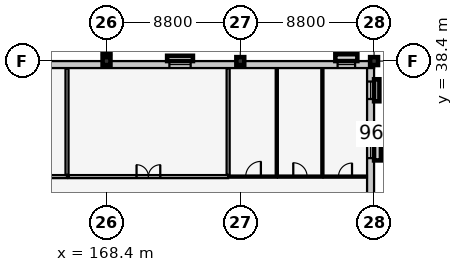
"""IFC4 building model, lengths in metres.
Left out: names, types, materials, properties, quantities, classifications, styles, units other than length and angle.
Written with IfcOpenShell. Run it as: python <this file> out.ifc"""

import sys

from ifc_helpers import new_model, si_unit, direction, frame, frame_2d, origin, origin_2d, place, context, subcontext, project, spatial, rectangle, extrude, element, fill, save


model = new_model("IFC4")
c1 = context("Model", 3, precision=1e-05, world=origin(), true_north=direction((0.0, 1.0)))
c2 = subcontext(c1, "Body", "Model", "MODEL_VIEW")
j1 = project(units=[si_unit("LENGTHUNIT", "METRE"), si_unit("PLANEANGLEUNIT", "RADIAN")], contexts=[c1])
p1 = place(None, origin())
s1 = spatial("IfcSite", under=j1, at=p1, CompositionType="ELEMENT")
p2 = place(p1, origin())
s2 = spatial("IfcBuilding", under=s1, at=p2, CompositionType="ELEMENT")
p3 = place(p2, frame((0.0, 0.0, 5.4)))
s3 = spatial("IfcBuildingStorey", under=s2, at=p3, CompositionType="ELEMENT", Elevation=5.4)
for number, where, z_axis, x_axis in (
    (1, (168.4, 38.4, 0.0), (0.0, 0.0, 1.0), (1.0, 0.0, 0.0)),
    (2, (177.2, 38.4, 0.0), (0.0, 0.0, 1.0), (1.0, 0.0, 0.0)),
    (3, (186.0, 38.4, 0.0), (0.0, 0.0, 1.0), (1.0, 0.0, 0.0)),
    (4, (168.4, 39.2, 0.0), (0.0, 0.0, 1.0), (1.0, 0.0, 0.0)),
):
    element("IfcColumn", number, at=place(p3, frame(where, z_axis=z_axis, x_axis=x_axis)), inside=s3, PredefinedType="COLUMN", context=c2, shape_type="SweptSolid", body=[
        extrude(rectangle(XDim=0.52, YDim=0.52, at=origin_2d()), origin(), (0.0, 0.0, 1.0), 4.2),
    ])
p4 = place(p3, frame((185.77, 38.4, 0.0), z_axis=(0.0, 0.0, 1.0), x_axis=(0.0, -1.0, 0.0)))
e5 = element("IfcWall", 5, at=p4, inside=s3, PredefinedType="SOLIDWALL", context=c2, shape_type="SweptSolid", body=[
    extrude(rectangle(XDim=38.4, YDim=0.46, at=frame_2d((19.2, 0.0))), origin(), (0.0, 0.0, 1.0), 3.095),
])
p5 = place(p4, frame((1.345, 0.0, 0.9)))
e6 = element("IfcOpeningElement", 6, at=p5, cuts=e5, PredefinedType="OPENING", context=c2, shape_type="SweptSolid", body=[
    extrude(rectangle(XDim=1.15, YDim=1.6, at=frame_2d((0.575, 0.8))), frame((0.0, 0.242, 0.0), z_axis=(0.0, -1.0, 0.0), x_axis=(1.0, 0.0, 0.0)), (0.0, 0.0, 1.0), 0.484),
])
p6 = place(p4, frame((5.135, 0.0, 0.9)))
e7 = element("IfcOpeningElement", 7, at=p6, cuts=e5, PredefinedType="OPENING", context=c2, shape_type="SweptSolid", body=[
    extrude(rectangle(XDim=1.25, YDim=1.6, at=frame_2d((0.625, 0.8))), frame((0.0, 0.242, 0.0), z_axis=(0.0, -1.0, 0.0), x_axis=(1.0, 0.0, 0.0)), (0.0, 0.0, 1.0), 0.484),
])
p7 = place(p3, frame((124.0, 38.17, 0.0), z_axis=(0.0, 0.0, 1.0), x_axis=(1.0, 0.0, 0.0)))
e8 = element("IfcWall", 8, at=p7, inside=s3, PredefinedType="SOLIDWALL", context=c2, shape_type="SweptSolid", body=[
    extrude(rectangle(XDim=62.0, YDim=0.46, at=frame_2d((31.0, 0.0))), origin(), (0.0, 0.0, 1.0), 3.095),
])
p8 = place(p7, frame((1.134, 0.0, 0.9)))
e9 = element("IfcOpeningElement", 9, at=p8, cuts=e8, PredefinedType="OPENING", context=c2, shape_type="SweptSolid", body=[
    extrude(rectangle(XDim=1.38, YDim=1.6, at=frame_2d((0.69, 0.8))), frame((0.0, 0.242, 0.0), z_axis=(0.0, -1.0, 0.0), x_axis=(1.0, 0.0, 0.0)), (0.0, 0.0, 1.0), 0.484),
])
p9 = place(p7, frame((4.721, 0.0, 0.9)))
e10 = element("IfcOpeningElement", 10, at=p9, cuts=e8, PredefinedType="OPENING", context=c2, shape_type="SweptSolid", body=[
    extrude(rectangle(XDim=1.5, YDim=1.6, at=frame_2d((0.75, 0.8))), frame((0.0, 0.242, 0.0), z_axis=(0.0, -1.0, 0.0), x_axis=(1.0, 0.0, 0.0)), (0.0, 0.0, 1.0), 0.484),
])
p10 = place(p7, frame((12.205, 0.0, 0.9)))
e11 = element("IfcOpeningElement", 11, at=p10, cuts=e8, PredefinedType="OPENING", context=c2, shape_type="SweptSolid", body=[
    extrude(rectangle(XDim=1.12, YDim=1.75, at=frame_2d((0.56, 0.875))), frame((0.0, 0.242, 0.0), z_axis=(0.0, -1.0, 0.0), x_axis=(1.0, 0.0, 0.0)), (0.0, 0.0, 1.0), 0.484),
])
p11 = place(p7, frame((15.792, 0.0, 0.9)))
e12 = element("IfcOpeningElement", 12, at=p11, cuts=e8, PredefinedType="OPENING", context=c2, shape_type="SweptSolid", body=[
    extrude(rectangle(XDim=1.24, YDim=1.75, at=frame_2d((0.62, 0.875))), frame((0.0, 0.242, 0.0), z_axis=(0.0, -1.0, 0.0), x_axis=(1.0, 0.0, 0.0)), (0.0, 0.0, 1.0), 0.484),
])
p12 = place(p7, frame((19.389, 0.0, 0.9)))
e13 = element("IfcOpeningElement", 13, at=p12, cuts=e8, PredefinedType="OPENING", context=c2, shape_type="SweptSolid", body=[
    extrude(rectangle(XDim=1.34, YDim=1.75, at=frame_2d((0.67, 0.875))), frame((0.0, 0.242, 0.0), z_axis=(0.0, -1.0, 0.0), x_axis=(1.0, 0.0, 0.0)), (0.0, 0.0, 1.0), 0.484),
])
p13 = place(p7, frame((34.147, 0.0, 0.9)))
e14 = element("IfcOpeningElement", 14, at=p13, cuts=e8, PredefinedType="OPENING", context=c2, shape_type="SweptSolid", body=[
    extrude(rectangle(XDim=1.0, YDim=1.35, at=frame_2d((0.5, 0.675))), frame((0.0, 0.242, 0.0), z_axis=(0.0, -1.0, 0.0), x_axis=(1.0, 0.0, 0.0)), (0.0, 0.0, 1.0), 0.484),
])
p14 = place(p7, frame((37.744, 0.0, 0.9)))
e15 = element("IfcOpeningElement", 15, at=p14, cuts=e8, PredefinedType="OPENING", context=c2, shape_type="SweptSolid", body=[
    extrude(rectangle(XDim=1.1, YDim=1.35, at=frame_2d((0.55, 0.675))), frame((0.0, 0.242, 0.0), z_axis=(0.0, -1.0, 0.0), x_axis=(1.0, 0.0, 0.0)), (0.0, 0.0, 1.0), 0.484),
])
p15 = place(p7, frame((48.535, 0.0, 0.9)))
e16 = element("IfcOpeningElement", 16, at=p15, cuts=e8, PredefinedType="OPENING", context=c2, shape_type="SweptSolid", body=[
    extrude(rectangle(XDim=1.4, YDim=1.35, at=frame_2d((0.7, 0.675))), frame((0.0, 0.242, 0.0), z_axis=(0.0, -1.0, 0.0), x_axis=(1.0, 0.0, 0.0)), (0.0, 0.0, 1.0), 0.484),
])
p16 = place(p7, frame((59.602, 0.0, 0.9)))
e17 = element("IfcOpeningElement", 17, at=p16, cuts=e8, PredefinedType="OPENING", context=c2, shape_type="SweptSolid", body=[
    extrude(rectangle(XDim=1.15, YDim=1.45, at=frame_2d((0.575, 0.725))), frame((0.0, 0.242, 0.0), z_axis=(0.0, -1.0, 0.0), x_axis=(1.0, 0.0, 0.0)), (0.0, 0.0, 1.0), 0.484),
])
p17 = place(p3, frame((155.46, 30.8, 0.0), z_axis=(0.0, 0.0, 1.0), x_axis=(1.0, 0.0, 0.0)))
e18 = element("IfcWall", 18, at=p17, inside=s3, PredefinedType="PARTITIONING", context=c2, shape_type="SweptSolid", body=[
    extrude(rectangle(XDim=10.34, YDim=0.2, at=frame_2d((5.17, 0.0))), origin(), (0.0, 0.0, 1.0), 3.94),
])
p18 = place(p17, frame((4.33, 0.0, 0.0)))
e19 = element("IfcOpeningElement", 19, at=p18, cuts=e18, PredefinedType="OPENING", context=c2, shape_type="SweptSolid", body=[
    extrude(rectangle(XDim=1.68, YDim=2.3, at=frame_2d((0.84, 1.15))), frame((0.0, 0.112, 0.0), z_axis=(0.0, -1.0, 0.0), x_axis=(1.0, 0.0, 0.0)), (0.0, 0.0, 1.0), 0.224),
])
p19 = place(p3, frame((165.8, 30.91, 0.0), z_axis=(0.0, 0.0, 1.0), x_axis=(0.0, 1.0, 0.0)))
e20 = element("IfcWall", 20, at=p19, inside=s3, PredefinedType="PARTITIONING", context=c2, shape_type="SweptSolid", body=[
    extrude(rectangle(XDim=7.02, YDim=0.2, at=frame_2d((3.51, 0.0))), origin(), (0.0, 0.0, 1.0), 3.94),
])
p20 = place(p3, frame((165.91, 30.8, 0.0), z_axis=(0.0, 0.0, 1.0), x_axis=(1.0, 0.0, 0.0)))
e21 = element("IfcWall", 21, at=p20, inside=s3, PredefinedType="PARTITIONING", context=c2, shape_type="SweptSolid", body=[
    extrude(rectangle(XDim=10.49, YDim=0.2, at=frame_2d((5.245, 0.0))), origin(), (0.0, 0.0, 1.0), 3.94),
])
p21 = place(p20, frame((4.465, 0.0, 0.0)))
e22 = element("IfcOpeningElement", 22, at=p21, cuts=e21, PredefinedType="OPENING", context=c2, shape_type="SweptSolid", body=[
    extrude(rectangle(XDim=1.56, YDim=2.25, at=frame_2d((0.78, 1.125))), frame((0.0, 0.112, 0.0), z_axis=(0.0, -1.0, 0.0), x_axis=(1.0, 0.0, 0.0)), (0.0, 0.0, 1.0), 0.224),
])
p22 = place(p3, frame((176.4, 30.91, 0.0), z_axis=(0.0, 0.0, 1.0), x_axis=(0.0, 1.0, 0.0)))
e23 = element("IfcWall", 23, at=p22, inside=s3, PredefinedType="PARTITIONING", context=c2, shape_type="SweptSolid", body=[
    extrude(rectangle(XDim=7.02, YDim=0.2, at=frame_2d((3.51, 0.0))), origin(), (0.0, 0.0, 1.0), 3.94),
])
p23 = place(p3, frame((176.51, 30.8, 0.0), z_axis=(0.0, 0.0, 1.0), x_axis=(1.0, 0.0, 0.0)))
e24 = element("IfcWall", 24, at=p23, inside=s3, PredefinedType="PARTITIONING", context=c2, shape_type="SweptSolid", body=[
    extrude(rectangle(XDim=3.09, YDim=0.14, at=frame_2d((1.545, 0.0))), origin(), (0.0, 0.0, 1.0), 3.94),
])
p24 = place(p23, frame((1.045, 0.0, 0.0)))
e25 = element("IfcOpeningElement", 25, at=p24, cuts=e24, PredefinedType="OPENING", context=c2, shape_type="SweptSolid", body=[
    extrude(rectangle(XDim=1.0, YDim=2.1, at=frame_2d((0.5, 1.05))), frame((0.0, 0.082, 0.0), z_axis=(0.0, -1.0, 0.0), x_axis=(1.0, 0.0, 0.0)), (0.0, 0.0, 1.0), 0.164),
])
p25 = place(p3, frame((179.6, 30.88, 0.0), z_axis=(0.0, 0.0, 1.0), x_axis=(0.0, 1.0, 0.0)))
e26 = element("IfcWall", 26, at=p25, inside=s3, PredefinedType="PARTITIONING", context=c2, shape_type="SweptSolid", body=[
    extrude(rectangle(XDim=7.05, YDim=0.14, at=frame_2d((3.525, 0.0))), origin(), (0.0, 0.0, 1.0), 3.94),
])
p26 = place(p3, frame((179.68, 30.8, 0.0), z_axis=(0.0, 0.0, 1.0), x_axis=(1.0, 0.0, 0.0)))
e27 = element("IfcWall", 27, at=p26, inside=s3, PredefinedType="PARTITIONING", context=c2, shape_type="SweptSolid", body=[
    extrude(rectangle(XDim=2.92, YDim=0.14, at=frame_2d((1.46, 0.0))), origin(), (0.0, 0.0, 1.0), 3.94),
])
p27 = place(p26, frame((1.005, 0.0, 0.0)))
e28 = element("IfcOpeningElement", 28, at=p27, cuts=e27, PredefinedType="OPENING", context=c2, shape_type="SweptSolid", body=[
    extrude(rectangle(XDim=0.91, YDim=2.06, at=frame_2d((0.455, 1.03))), frame((0.0, 0.082, 0.0), z_axis=(0.0, -1.0, 0.0), x_axis=(1.0, 0.0, 0.0)), (0.0, 0.0, 1.0), 0.164),
])
p28 = place(p3, frame((182.6, 30.88, 0.0), z_axis=(0.0, 0.0, 1.0), x_axis=(0.0, 1.0, 0.0)))
e29 = element("IfcWall", 29, at=p28, inside=s3, PredefinedType="PARTITIONING", context=c2, shape_type="SweptSolid", body=[
    extrude(rectangle(XDim=7.05, YDim=0.14, at=frame_2d((3.525, 0.0))), origin(), (0.0, 0.0, 1.0), 3.94),
])
p29 = place(p3, frame((182.68, 30.8, 0.0), z_axis=(0.0, 0.0, 1.0), x_axis=(1.0, 0.0, 0.0)))
e30 = element("IfcWall", 30, at=p29, inside=s3, PredefinedType="PARTITIONING", context=c2, shape_type="SweptSolid", body=[
    extrude(rectangle(XDim=2.85, YDim=0.14, at=frame_2d((1.425, 0.0))), origin(), (0.0, 0.0, 1.0), 3.94),
])
p30 = place(p29, frame((0.98, 0.0, 0.0)))
e31 = element("IfcOpeningElement", 31, at=p30, cuts=e30, PredefinedType="OPENING", context=c2, shape_type="SweptSolid", body=[
    extrude(rectangle(XDim=0.89, YDim=2.05, at=frame_2d((0.445, 1.025))), frame((0.0, 0.082, 0.0), z_axis=(0.0, -1.0, 0.0), x_axis=(1.0, 0.0, 0.0)), (0.0, 0.0, 1.0), 0.164),
])
p31 = place(p5, origin())
e32 = element("IfcWindow", 32, at=p31, inside=s3, PartitioningType="SINGLE_PANEL", PredefinedType="WINDOW", context=c2, shape_type="SweptSolid", body=[
    extrude(rectangle(XDim=1.15, YDim=1.6, at=frame_2d((0.575, 0.8))), frame((0.0, 0.03, 0.0), z_axis=(0.0, -1.0, 0.0), x_axis=(1.0, 0.0, 0.0)), (0.0, 0.0, 1.0), 0.06),
])
fill(e6, e32)
p32 = place(p6, origin())
e33 = element("IfcWindow", 33, at=p32, inside=s3, PartitioningType="SINGLE_PANEL", PredefinedType="WINDOW", context=c2, shape_type="SweptSolid", body=[
    extrude(rectangle(XDim=1.25, YDim=1.6, at=frame_2d((0.625, 0.8))), frame((0.0, 0.03, 0.0), z_axis=(0.0, -1.0, 0.0), x_axis=(1.0, 0.0, 0.0)), (0.0, 0.0, 1.0), 0.06),
])
fill(e7, e33)
p33 = place(p15, origin())
e34 = element("IfcWindow", 34, at=p33, inside=s3, PartitioningType="SINGLE_PANEL", PredefinedType="WINDOW", context=c2, shape_type="SweptSolid", body=[
    extrude(rectangle(XDim=1.4, YDim=1.35, at=frame_2d((0.7, 0.675))), frame((0.0, 0.03, 0.0), z_axis=(0.0, -1.0, 0.0), x_axis=(1.0, 0.0, 0.0)), (0.0, 0.0, 1.0), 0.06),
])
fill(e16, e34)
p34 = place(p16, origin())
e35 = element("IfcWindow", 35, at=p34, inside=s3, PartitioningType="SINGLE_PANEL", PredefinedType="WINDOW", context=c2, shape_type="SweptSolid", body=[
    extrude(rectangle(XDim=1.15, YDim=1.45, at=frame_2d((0.575, 0.725))), frame((0.0, 0.03, 0.0), z_axis=(0.0, -1.0, 0.0), x_axis=(1.0, 0.0, 0.0)), (0.0, 0.0, 1.0), 0.06),
])
fill(e17, e35)
p35 = place(p21, origin())
e36 = element("IfcDoor", 36, at=p35, inside=s3, OperationType="DOUBLE_DOOR_SINGLE_SWING", PredefinedType="DOOR", context=c2, shape_type="SweptSolid", body=[
    extrude(rectangle(XDim=1.56, YDim=2.25, at=frame_2d((0.78, 1.125))), frame((0.0, 0.025, 0.0), z_axis=(0.0, -1.0, 0.0), x_axis=(1.0, 0.0, 0.0)), (0.0, 0.0, 1.0), 0.05),
])
fill(e22, e36)
p36 = place(p24, origin())
e37 = element("IfcDoor", 37, at=p36, inside=s3, OperationType="SINGLE_SWING_RIGHT", PredefinedType="DOOR", context=c2, shape_type="SweptSolid", body=[
    extrude(rectangle(XDim=1.0, YDim=2.1, at=frame_2d((0.5, 1.05))), frame((0.0, 0.025, 0.0), z_axis=(0.0, -1.0, 0.0), x_axis=(1.0, 0.0, 0.0)), (0.0, 0.0, 1.0), 0.05),
])
fill(e25, e37)
p37 = place(p27, origin())
e38 = element("IfcDoor", 38, at=p37, inside=s3, OperationType="SINGLE_SWING_LEFT", PredefinedType="DOOR", context=c2, shape_type="SweptSolid", body=[
    extrude(rectangle(XDim=0.91, YDim=2.06, at=frame_2d((0.455, 1.03))), frame((0.0, 0.025, 0.0), z_axis=(0.0, -1.0, 0.0), x_axis=(1.0, 0.0, 0.0)), (0.0, 0.0, 1.0), 0.05),
])
fill(e28, e38)
p38 = place(p30, origin())
e39 = element("IfcDoor", 39, at=p38, inside=s3, OperationType="SINGLE_SWING_RIGHT", PredefinedType="DOOR", context=c2, shape_type="SweptSolid", body=[
    extrude(rectangle(XDim=0.89, YDim=2.05, at=frame_2d((0.445, 1.025))), frame((0.0, 0.025, 0.0), z_axis=(0.0, -1.0, 0.0), x_axis=(1.0, 0.0, 0.0)), (0.0, 0.0, 1.0), 0.05),
])
fill(e31, e39)
save(model, sys.argv[1])
